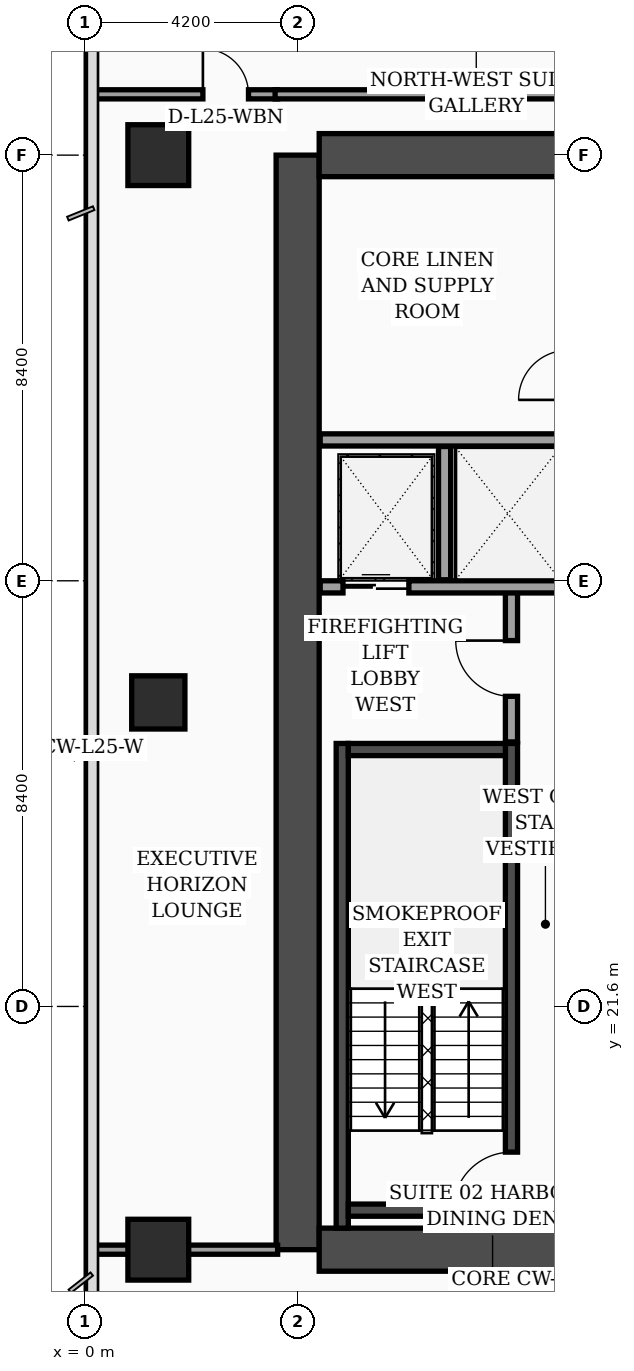
"""IFC4 building model, lengths in metres.
Left out: names, types, materials, properties, quantities, classifications, styles, units other than length and angle.
Written with IfcOpenShell. Run it as: python <this file> out.ifc"""

import sys

from ifc_helpers import new_model, si_unit, direction, frame, frame_2d, origin, origin_2d, place, context, subcontext, project, spatial, rectangle, extrude, element, fill, save


model = new_model("IFC4")
c1 = context("Model", 3, precision=1e-05, world=origin(), true_north=direction((0.0, 1.0)))
c2 = subcontext(c1, "Body", "Model", "MODEL_VIEW")
j1 = project(units=[si_unit("LENGTHUNIT", "METRE"), si_unit("PLANEANGLEUNIT", "RADIAN")], contexts=[c1])
p1 = place(None, origin())
s1 = spatial("IfcSite", under=j1, at=p1, CompositionType="ELEMENT")
p2 = place(p1, origin())
s2 = spatial("IfcBuilding", under=s1, at=p2, CompositionType="ELEMENT")
p3 = place(p2, frame((0.0, 0.0, 105.0)))
s3 = spatial("IfcBuildingStorey", under=s2, at=p3, CompositionType="ELEMENT", Elevation=105.0)
p4 = place(p3, frame((4.2, 16.8, 0.0), z_axis=(0.0, 0.0, 1.0), x_axis=(0.0, 1.0, 0.0)))
e1 = element("IfcWall", 1, at=p4, inside=s3, PredefinedType="SHEAR", context=c2, shape_type="SweptSolid", body=[
    extrude(rectangle(XDim=21.6, YDim=0.85, at=frame_2d((10.8, 0.0))), origin(), (0.0, 0.0, 1.0), 3.56),
])
for number, where, z_axis, x_axis in (
    (2, (4.625, 38.4, 0.0), (0.0, 0.0, 1.0), (1.0, 0.0, 0.0)),
    (3, (4.625, 16.8, 0.0), (0.0, 0.0, 1.0), (1.0, 0.0, 0.0)),
):
    element("IfcWall", number, at=place(p3, frame(where, z_axis=z_axis, x_axis=x_axis)), inside=s3, PredefinedType="SHEAR", context=c2, shape_type="SweptSolid", body=[
        extrude(rectangle(XDim=9.95, YDim=0.85, at=frame_2d((4.975, 0.0))), origin(), (0.0, 0.0, 1.0), 3.56),
    ])
p5 = place(p3, frame((5.08, 17.225, 0.0), z_axis=(0.0, 0.0, 1.0), x_axis=(0.0, 1.0, 0.0)))
e4 = element("IfcWall", 4, at=p5, inside=s3, PredefinedType="SOLIDWALL", context=c2, shape_type="SweptSolid", body=[
    extrude(rectangle(XDim=9.565, YDim=0.24, at=frame_2d((4.782, 0.0))), origin(), (0.0, 0.0, 1.0), 3.56),
])
p6 = place(p3, frame((8.42, 17.225, 0.0), z_axis=(0.0, 0.0, 1.0), x_axis=(0.0, 1.0, 0.0)))
e5 = element("IfcWall", 5, at=p6, inside=s3, PredefinedType="SOLIDWALL", context=c2, shape_type="SweptSolid", body=[
    extrude(rectangle(XDim=9.565, YDim=0.24, at=frame_2d((4.782, 0.0))), origin(), (0.0, 0.0, 1.0), 3.56),
])
p7 = place(p6, frame((0.35, 0.0, 0.0)))
e6 = element("IfcOpeningElement", 6, at=p7, cuts=e5, PredefinedType="OPENING", context=c2, shape_type="SweptSolid", body=[
    extrude(rectangle(XDim=1.15, YDim=2.2, at=frame_2d((0.575, 1.1))), frame((0.0, 0.13, 0.0), z_axis=(0.0, -1.0, 0.0), x_axis=(1.0, 0.0, 0.0)), (0.0, 0.0, 1.0), 0.26),
])
for number, where, z_axis, x_axis in (
    (7, (5.2, 17.58, 0.0), (0.0, 0.0, 1.0), (1.0, 0.0, 0.0)),
    (8, (5.2, 26.67, 0.0), (0.0, 0.0, 1.0), (1.0, 0.0, 0.0)),
):
    element("IfcWall", number, at=place(p3, frame(where, z_axis=z_axis, x_axis=x_axis)), inside=s3, PredefinedType="SOLIDWALL", context=c2, shape_type="SweptSolid", body=[
        extrude(rectangle(XDim=3.1, YDim=0.24, at=frame_2d((1.55, 0.0))), origin(), (0.0, 0.0, 1.0), 3.56),
    ])
p8 = place(p3, frame((1.45, 16.8, 0.0), z_axis=(0.0, 0.0, 1.0), x_axis=(1.0, 0.0, 0.0)))
e9 = element("IfcColumn", 9, at=p8, inside=s3, PredefinedType="COLUMN", context=c2, shape_type="SweptSolid", body=[
    extrude(rectangle(XDim=1.2, YDim=1.2, at=origin_2d()), origin(), (0.0, 0.0, 1.0), 3.56),
])
p9 = place(p3, frame((1.45, 27.6, 0.0), z_axis=(0.0, 0.0, 1.0), x_axis=(1.0, 0.0, 0.0)))
e10 = element("IfcColumn", 10, at=p9, inside=s3, PredefinedType="COLUMN", context=c2, shape_type="SweptSolid", body=[
    extrude(rectangle(XDim=1.05, YDim=1.05, at=origin_2d()), origin(), (0.0, 0.0, 1.0), 3.56),
])
p10 = place(p3, frame((1.45, 38.4, 0.0), z_axis=(0.0, 0.0, 1.0), x_axis=(1.0, 0.0, 0.0)))
e11 = element("IfcColumn", 11, at=p10, inside=s3, PredefinedType="COLUMN", context=c2, shape_type="SweptSolid", body=[
    extrude(rectangle(XDim=1.2, YDim=1.2, at=origin_2d()), origin(), (0.0, 0.0, 1.0), 3.56),
])
p11 = place(p3, frame((8.42, 26.82, 0.0), z_axis=(0.0, 0.0, 1.0), x_axis=(0.0, 1.0, 0.0)))
e12 = element("IfcWall", 12, at=p11, inside=s3, PredefinedType="SOLIDWALL", context=c2, shape_type="SweptSolid", body=[
    extrude(rectangle(XDim=3.0, YDim=0.24, at=frame_2d((1.5, 0.0))), origin(), (0.0, 0.0, 1.0), 3.56),
])
p12 = place(p11, frame((0.9, 0.0, 0.0)))
e13 = element("IfcOpeningElement", 13, at=p12, cuts=e12, PredefinedType="OPENING", context=c2, shape_type="SweptSolid", body=[
    extrude(rectangle(XDim=1.1, YDim=2.2, at=frame_2d((0.55, 1.1))), frame((0.0, 0.13, 0.0), z_axis=(0.0, -1.0, 0.0), x_axis=(1.0, 0.0, 0.0)), (0.0, 0.0, 1.0), 0.26),
])
p13 = place(p3, frame((4.645, 29.88, 0.0), z_axis=(0.0, 0.0, 1.0), x_axis=(1.0, 0.0, 0.0)))
e14 = element("IfcWall", 14, at=p13, inside=s3, PredefinedType="SOLIDWALL", context=c2, shape_type="SweptSolid", body=[
    extrude(rectangle(XDim=4.775, YDim=0.24, at=frame_2d((2.387, 0.0))), origin(), (0.0, 0.0, 1.0), 3.56),
])
p14 = place(p13, frame((0.45, 0.0, 0.0)))
e15 = element("IfcOpeningElement", 15, at=p14, cuts=e14, PredefinedType="OPENING", context=c2, shape_type="SweptSolid", body=[
    extrude(rectangle(XDim=1.3, YDim=2.35, at=frame_2d((0.65, 1.175))), frame((0.0, 0.13, 0.0), z_axis=(0.0, -1.0, 0.0), x_axis=(1.0, 0.0, 0.0)), (0.0, 0.0, 1.0), 0.26),
])
p15 = place(p3, frame((7.1, 30.02, 0.0), z_axis=(0.0, 0.0, 1.0), x_axis=(0.0, 1.0, 0.0)))
e16 = element("IfcWall", 16, at=p15, inside=s3, PredefinedType="SOLIDWALL", context=c2, shape_type="SweptSolid", body=[
    extrude(rectangle(XDim=2.63, YDim=0.24, at=frame_2d((1.315, 0.0))), origin(), (0.0, 0.0, 1.0), 3.56),
])
p16 = place(p3, frame((4.645, 32.78, 0.0), z_axis=(0.0, 0.0, 1.0), x_axis=(1.0, 0.0, 0.0)))
e17 = element("IfcWall", 17, at=p16, inside=s3, PredefinedType="SOLIDWALL", context=c2, shape_type="SweptSolid", body=[
    extrude(rectangle(XDim=4.775, YDim=0.24, at=frame_2d((2.387, 0.0))), origin(), (0.0, 0.0, 1.0), 3.19),
])
p17 = place(p3, frame((0.08, 16.8, 0.0), z_axis=(0.0, 0.0, 1.0), x_axis=(1.0, 0.0, 0.0)))
e18 = element("IfcWall", 18, at=p17, inside=s3, PredefinedType="PARTITIONING", context=c2, shape_type="SweptSolid", body=[
    extrude(rectangle(XDim=3.725, YDim=0.18, at=frame_2d((1.862, 0.0))), origin(), (0.0, 0.0, 1.0), 2.84),
])
p18 = place(p3, frame((0.08, 39.6, 0.0), z_axis=(0.0, 0.0, 1.0), x_axis=(1.0, 0.0, 0.0)))
e19 = element("IfcWall", 19, at=p18, inside=s3, PredefinedType="PARTITIONING", context=c2, shape_type="SweptSolid", body=[
    extrude(rectangle(XDim=3.725, YDim=0.18, at=frame_2d((1.862, 0.0))), origin(), (0.0, 0.0, 1.0), 2.84),
])
p19 = place(p18, frame((2.25, 0.0, 0.0)))
e20 = element("IfcOpeningElement", 20, at=p19, cuts=e19, PredefinedType="OPENING", context=c2, shape_type="SweptSolid", body=[
    extrude(rectangle(XDim=0.9, YDim=2.15, at=frame_2d((0.45, 1.075))), frame((0.0, 0.1, 0.0), z_axis=(0.0, -1.0, 0.0), x_axis=(1.0, 0.0, 0.0)), (0.0, 0.0, 1.0), 0.2),
])
p20 = place(p3, frame((3.755, 39.6, 0.0), z_axis=(0.0, 0.0, 1.0), x_axis=(1.0, 0.0, 0.0)))
e21 = element("IfcWall", 21, at=p20, inside=s3, PredefinedType="PARTITIONING", context=c2, shape_type="SweptSolid", body=[
    extrude(rectangle(XDim=11.395, YDim=0.18, at=frame_2d((5.698, 0.0))), origin(), (0.0, 0.0, 1.0), 2.84),
])
p21 = place(p12, origin())
e22 = element("IfcDoor", 22, at=p21, inside=s3, OperationType="SINGLE_SWING_RIGHT", PredefinedType="DOOR", context=c2, shape_type="SweptSolid", body=[
    extrude(rectangle(XDim=1.1, YDim=2.2, at=frame_2d((0.55, 1.1))), frame((0.0, 0.025, 0.0), z_axis=(0.0, -1.0, 0.0), x_axis=(1.0, 0.0, 0.0)), (0.0, 0.0, 1.0), 0.05),
])
fill(e13, e22)
p22 = place(p14, origin())
e23 = element("IfcDoor", 23, at=p22, inside=s3, OperationType="DOUBLE_DOOR_SLIDING", PredefinedType="DOOR", context=c2, shape_type="SweptSolid", body=[
    extrude(rectangle(XDim=1.3, YDim=2.35, at=frame_2d((0.65, 1.175))), frame((0.0, 0.025, 0.0), z_axis=(0.0, -1.0, 0.0), x_axis=(1.0, 0.0, 0.0)), (0.0, 0.0, 1.0), 0.05),
])
fill(e15, e23)
p23 = place(p19, origin())
e24 = element("IfcDoor", 24, at=p23, inside=s3, OperationType="SINGLE_SWING_LEFT", PredefinedType="DOOR", context=c2, shape_type="SweptSolid", body=[
    extrude(rectangle(XDim=0.9, YDim=2.15, at=frame_2d((0.45, 1.075))), frame((0.0, 0.025, 0.0), z_axis=(0.0, -1.0, 0.0), x_axis=(1.0, 0.0, 0.0)), (0.0, 0.0, 1.0), 0.05),
])
fill(e20, e24)
p24 = place(p7, origin())
e25 = element("IfcDoor", 25, at=p24, inside=s3, OperationType="SINGLE_SWING_LEFT", PredefinedType="DOOR", context=c2, shape_type="SweptSolid", body=[
    extrude(rectangle(XDim=1.15, YDim=2.2, at=frame_2d((0.575, 1.1))), frame((0.0, 0.025, 0.0), z_axis=(0.0, -1.0, 0.0), x_axis=(1.0, 0.0, 0.0)), (0.0, 0.0, 1.0), 0.05),
])
fill(e6, e25)
save(model, sys.argv[1])
